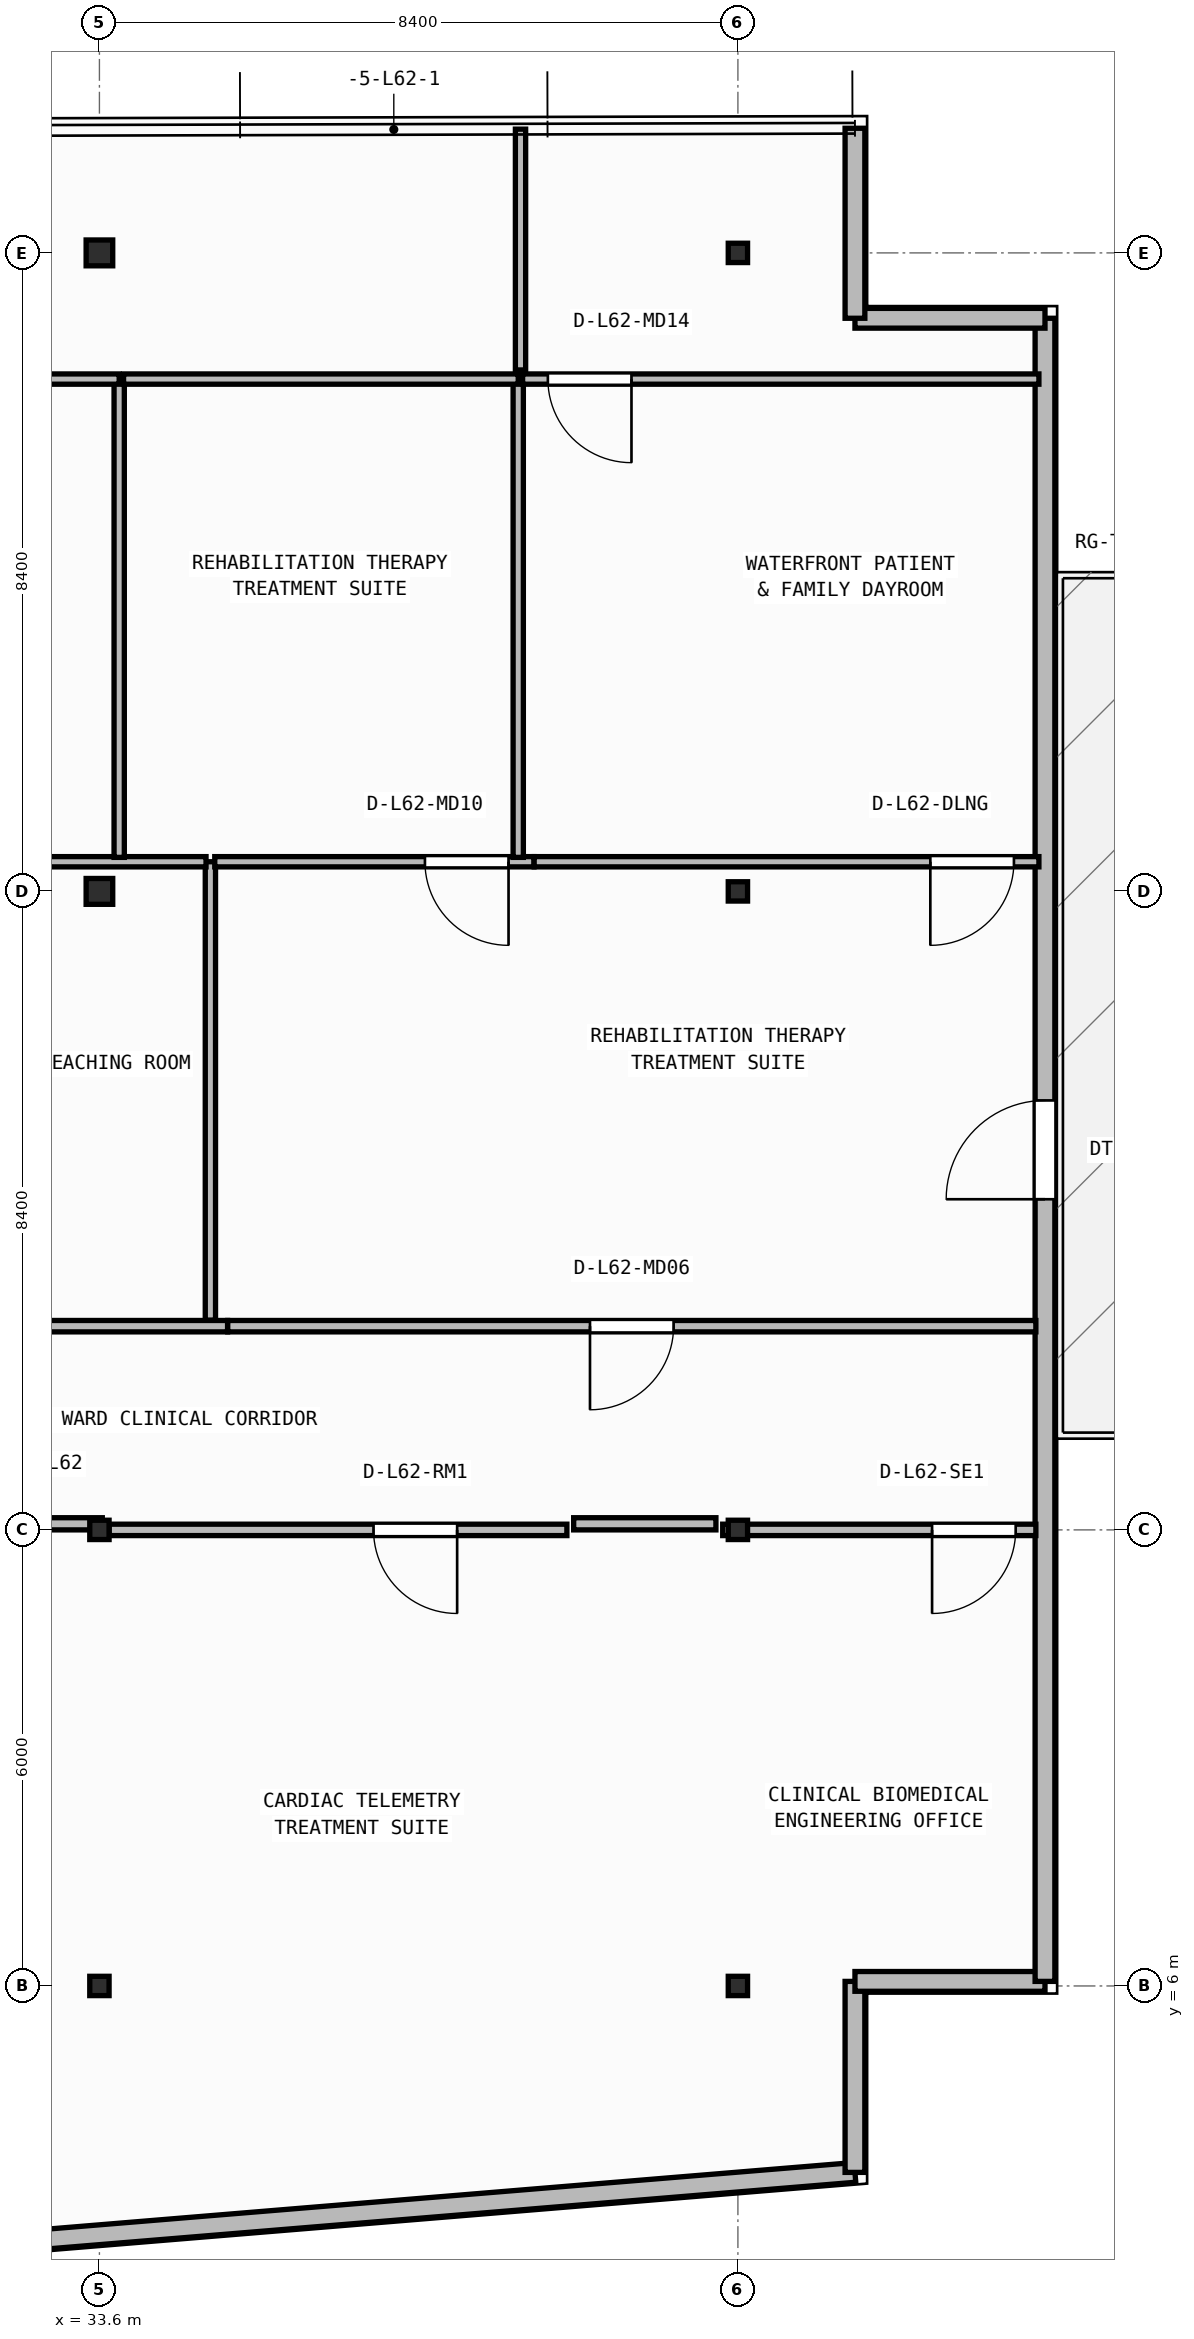
"""IFC4 building model, lengths in metres.
Left out: names, types, materials, properties, quantities, classifications, styles, units other than length and angle.
Written with IfcOpenShell. Run it as: python <this file> out.ifc"""

import sys

from ifc_helpers import new_model, si_unit, direction, frame, frame_2d, origin, origin_2d, place, context, subcontext, project, spatial, rectangle, i_section, extrude, element, fill, save


model = new_model("IFC4")
c1 = context("Model", 3, precision=1e-05, world=origin(), true_north=direction((0.0, 1.0)))
c2 = subcontext(c1, "Body", "Model", "MODEL_VIEW")
j1 = project(units=[si_unit("LENGTHUNIT", "METRE"), si_unit("PLANEANGLEUNIT", "RADIAN")], contexts=[c1])
p1 = place(None, origin())
s1 = spatial("IfcSite", under=j1, at=p1, CompositionType="ELEMENT")
p2 = place(p1, origin())
s2 = spatial("IfcBuilding", under=s1, at=p2, CompositionType="ELEMENT")
p3 = place(p2, frame((0.0, 0.0, 252.6)))
s3 = spatial("IfcBuildingStorey", under=s2, at=p3, CompositionType="ELEMENT", Elevation=252.6)
for number, where, z_axis, x_axis in (
    (1, (33.6, 6.0, 0.0), (0.0, 0.0, 1.0), (1.0, 0.0, 0.0)),
    (2, (42.0, 6.0, 0.0), (0.0, 0.0, 1.0), (1.0, 0.0, 0.0)),
    (3, (33.6, 12.0, 0.0), (0.0, 0.0, 1.0), (1.0, 0.0, 0.0)),
    (4, (42.0, 12.0, 0.0), (0.0, 0.0, 1.0), (1.0, 0.0, 0.0)),
):
    element("IfcColumn", number, at=place(p3, frame(where, z_axis=z_axis, x_axis=x_axis)), inside=s3, PredefinedType="COLUMN", context=c2, shape_type="SweptSolid", body=[
        extrude(i_section(OverallWidth=0.254, OverallDepth=0.254, WebThickness=0.009, FlangeThickness=0.014, FilletRadius=0.013, at=origin_2d()), origin(), (0.0, 0.0, 1.0), 3.95),
    ])
p4 = place(p3, frame((33.6, 20.4, 0.0), z_axis=(0.0, 0.0, 1.0), x_axis=(1.0, 0.0, 0.0)))
e5 = element("IfcColumn", 5, at=p4, inside=s3, PredefinedType="COLUMN", context=c2, shape_type="SweptSolid", body=[
    extrude(i_section(OverallWidth=0.35, OverallDepth=0.34, WebThickness=0.016, FlangeThickness=0.028, at=origin_2d()), origin(), (0.0, 0.0, 1.0), 3.95),
])
p5 = place(p3, frame((42.0, 20.4, 0.0), z_axis=(0.0, 0.0, 1.0), x_axis=(1.0, 0.0, 0.0)))
e6 = element("IfcColumn", 6, at=p5, inside=s3, PredefinedType="COLUMN", context=c2, shape_type="SweptSolid", body=[
    extrude(i_section(OverallWidth=0.254, OverallDepth=0.254, WebThickness=0.009, FlangeThickness=0.014, FilletRadius=0.013, at=origin_2d()), origin(), (0.0, 0.0, 1.0), 3.95),
])
p6 = place(p3, frame((33.6, 28.8, 0.0), z_axis=(0.0, 0.0, 1.0), x_axis=(1.0, 0.0, 0.0)))
e7 = element("IfcColumn", 7, at=p6, inside=s3, PredefinedType="COLUMN", context=c2, shape_type="SweptSolid", body=[
    extrude(i_section(OverallWidth=0.35, OverallDepth=0.34, WebThickness=0.016, FlangeThickness=0.028, at=origin_2d()), origin(), (0.0, 0.0, 1.0), 3.95),
])
p7 = place(p3, frame((42.0, 28.8, 0.0), z_axis=(0.0, 0.0, 1.0), x_axis=(1.0, 0.0, 0.0)))
e8 = element("IfcColumn", 8, at=p7, inside=s3, PredefinedType="COLUMN", context=c2, shape_type="SweptSolid", body=[
    extrude(i_section(OverallWidth=0.254, OverallDepth=0.254, WebThickness=0.009, FlangeThickness=0.014, FilletRadius=0.013, at=origin_2d()), origin(), (0.0, 0.0, 1.0), 3.95),
])
p8 = place(p3, frame((2.66, 0.174, 0.0), z_axis=(0.0, 0.0, 1.0), x_axis=(0.996611813627, 0.082248969229, 0.0)))
e9 = element("IfcWall", 9, at=p8, inside=s3, PredefinedType="STANDARD", context=c2, shape_type="SweptSolid", body=[
    extrude(rectangle(XDim=41.019, YDim=0.26, at=frame_2d((20.51, 0.0))), origin(), (0.0, 0.0, 1.0), 3.71),
])
p9 = place(p8, frame((19.31, 0.0, 0.9)))
e10 = element("IfcOpeningElement", 10, at=p9, cuts=e9, PredefinedType="OPENING", context=c2, shape_type="SweptSolid", body=[
    extrude(rectangle(XDim=2.4, YDim=1.65, at=frame_2d((1.2, 0.825))), frame((0.0, 0.14, 0.0), z_axis=(0.0, -1.0, 0.0), x_axis=(1.0, 0.0, 0.0)), (0.0, 0.0, 1.0), 0.28),
])
p10 = place(p3, frame((43.54, 3.547, 0.0), z_axis=(0.0, 0.0, 1.0), x_axis=(0.0, 1.0, 0.0)))
e11 = element("IfcWall", 11, at=p10, inside=s3, PredefinedType="STANDARD", context=c2, shape_type="SweptSolid", body=[
    extrude(rectangle(XDim=2.513, YDim=0.26, at=frame_2d((1.256, 0.0))), origin(), (0.0, 0.0, 1.0), 3.71),
])
p11 = place(p3, frame((43.54, 6.06, 0.0), z_axis=(0.0, 0.0, 1.0), x_axis=(1.0, 0.0, 0.0)))
e12 = element("IfcWall", 12, at=p11, inside=s3, PredefinedType="STANDARD", context=c2, shape_type="SweptSolid", body=[
    extrude(rectangle(XDim=2.5, YDim=0.26, at=frame_2d((1.25, 0.0))), origin(), (0.0, 0.0, 1.0), 3.71),
])
p12 = place(p3, frame((46.04, 6.06, 0.0), z_axis=(0.0, 0.0, 1.0), x_axis=(0.0, 1.0, 0.0)))
e13 = element("IfcWall", 13, at=p12, inside=s3, PredefinedType="STANDARD", context=c2, shape_type="SweptSolid", body=[
    extrude(rectangle(XDim=21.88, YDim=0.26, at=frame_2d((10.94, 0.0))), origin(), (0.0, 0.0, 1.0), 3.71),
])
p13 = place(p12, frame((10.29, 0.0, 0.0)))
e14 = element("IfcOpeningElement", 14, at=p13, cuts=e13, PredefinedType="OPENING", context=c2, shape_type="SweptSolid", body=[
    extrude(rectangle(XDim=1.3, YDim=2.15, at=frame_2d((0.65, 1.075))), frame((0.0, 0.14, 0.0), z_axis=(0.0, -1.0, 0.0), x_axis=(1.0, 0.0, 0.0)), (0.0, 0.0, 1.0), 0.28),
])
p14 = place(p3, frame((46.04, 27.94, 0.0), z_axis=(0.0, 0.0, 1.0), x_axis=(-1.0, 0.0, 0.0)))
e15 = element("IfcWall", 15, at=p14, inside=s3, PredefinedType="STANDARD", context=c2, shape_type="SweptSolid", body=[
    extrude(rectangle(XDim=2.5, YDim=0.26, at=frame_2d((1.25, 0.0))), origin(), (0.0, 0.0, 1.0), 3.71),
])
p15 = place(p3, frame((43.54, 27.94, 0.0), z_axis=(0.0, 0.0, 1.0), x_axis=(0.0, 1.0, 0.0)))
e16 = element("IfcWall", 16, at=p15, inside=s3, PredefinedType="STANDARD", context=c2, shape_type="SweptSolid", body=[
    extrude(rectangle(XDim=2.5, YDim=0.26, at=frame_2d((1.25, 0.0))), origin(), (0.0, 0.0, 1.0), 3.71),
])
p16 = place(p3, frame((39.75, 12.0, 0.0), z_axis=(0.0, 0.0, 1.0), x_axis=(-1.0, 0.0, 0.0)))
e17 = element("IfcWall", 17, at=p16, inside=s3, PredefinedType="PARTITIONING", context=c2, shape_type="SweptSolid", body=[
    extrude(rectangle(XDim=6.023, YDim=0.15, at=frame_2d((3.011, 0.0))), origin(), (0.0, 0.0, 1.0), 3.157),
])
p17 = place(p16, frame((1.444, 0.0, 0.0)))
e18 = element("IfcOpeningElement", 18, at=p17, cuts=e17, PredefinedType="OPENING", context=c2, shape_type="SweptSolid", body=[
    extrude(rectangle(XDim=1.1, YDim=2.1, at=frame_2d((0.55, 1.05))), frame((0.0, 0.085, 0.0), z_axis=(0.0, -1.0, 0.0), x_axis=(1.0, 0.0, 0.0)), (0.0, 0.0, 1.0), 0.17),
])
p18 = place(p3, frame((45.92, 12.0, 0.0), z_axis=(0.0, 0.0, 1.0), x_axis=(-1.0, 0.0, 0.0)))
e19 = element("IfcWall", 19, at=p18, inside=s3, PredefinedType="PARTITIONING", context=c2, shape_type="SweptSolid", body=[
    extrude(rectangle(XDim=4.12, YDim=0.15, at=frame_2d((2.06, 0.0))), origin(), (0.0, 0.0, 1.0), 3.157),
])
p19 = place(p18, frame((0.265, 0.0, 0.0)))
e20 = element("IfcOpeningElement", 20, at=p19, cuts=e19, PredefinedType="OPENING", context=c2, shape_type="SweptSolid", body=[
    extrude(rectangle(XDim=1.1, YDim=2.1, at=frame_2d((0.55, 1.05))), frame((0.0, 0.085, 0.0), z_axis=(0.0, -1.0, 0.0), x_axis=(1.0, 0.0, 0.0)), (0.0, 0.0, 1.0), 0.17),
])
p20 = place(p3, frame((35.286, 14.68, 0.0), z_axis=(0.0, 0.0, 1.0), x_axis=(-1.0, 0.0, 0.0)))
e21 = element("IfcWall", 21, at=p20, inside=s3, PredefinedType="PARTITIONING", context=c2, shape_type="SweptSolid", body=[
    extrude(rectangle(XDim=9.298, YDim=0.15, at=frame_2d((4.649, 0.0))), origin(), (0.0, 0.0, 1.0), 3.71),
])
p21 = place(p20, frame((4.099, 0.0, 0.0)))
e22 = element("IfcOpeningElement", 22, at=p21, cuts=e21, PredefinedType="OPENING", context=c2, shape_type="SweptSolid", body=[
    extrude(rectangle(XDim=1.1, YDim=2.1, at=frame_2d((0.55, 1.05))), frame((0.0, 0.085, 0.0), z_axis=(0.0, -1.0, 0.0), x_axis=(1.0, 0.0, 0.0)), (0.0, 0.0, 1.0), 0.17),
])
p22 = place(p3, frame((45.92, 14.68, 0.0), z_axis=(0.0, 0.0, 1.0), x_axis=(-1.0, 0.0, 0.0)))
e23 = element("IfcWall", 23, at=p22, inside=s3, PredefinedType="PARTITIONING", context=c2, shape_type="SweptSolid", body=[
    extrude(rectangle(XDim=10.632, YDim=0.15, at=frame_2d((5.316, 0.0))), origin(), (0.0, 0.0, 1.0), 3.71),
])
p23 = place(p22, frame((4.766, 0.0, 0.0)))
e24 = element("IfcOpeningElement", 24, at=p23, cuts=e23, PredefinedType="OPENING", context=c2, shape_type="SweptSolid", body=[
    extrude(rectangle(XDim=1.1, YDim=2.1, at=frame_2d((0.55, 1.05))), frame((0.0, 0.085, 0.0), z_axis=(0.0, -1.0, 0.0), x_axis=(1.0, 0.0, 0.0)), (0.0, 0.0, 1.0), 0.17),
])
p24 = place(p3, frame((35.06, 14.76, 0.0), z_axis=(0.0, 0.0, 1.0), x_axis=(0.0, 1.0, 0.0)))
e25 = element("IfcWall", 25, at=p24, inside=s3, PredefinedType="PARTITIONING", context=c2, shape_type="SweptSolid", body=[
    extrude(rectangle(XDim=6.03, YDim=0.135, at=frame_2d((3.015, 0.0))), origin(), (0.0, 0.0, 1.0), 3.71),
])
p25 = place(p3, frame((35.002, 20.79, 0.0), z_axis=(0.0, 0.0, 1.0), x_axis=(-1.0, 0.0, 0.0)))
e26 = element("IfcWall", 26, at=p25, inside=s3, PredefinedType="PARTITIONING", context=c2, shape_type="SweptSolid", body=[
    extrude(rectangle(XDim=9.185, YDim=0.135, at=frame_2d((4.593, 0.0))), origin(), (0.0, 0.0, 1.0), 3.157),
])
p26 = place(p25, frame((5.003, 0.0, 0.0)))
e27 = element("IfcOpeningElement", 27, at=p26, cuts=e26, PredefinedType="OPENING", context=c2, shape_type="SweptSolid", body=[
    extrude(rectangle(XDim=1.1, YDim=2.1, at=frame_2d((0.55, 1.05))), frame((0.0, 0.077, 0.0), z_axis=(0.0, -1.0, 0.0), x_axis=(1.0, 0.0, 0.0)), (0.0, 0.0, 1.0), 0.155),
])
p27 = place(p3, frame((39.317, 20.79, 0.0), z_axis=(0.0, 0.0, 1.0), x_axis=(-1.0, 0.0, 0.0)))
e28 = element("IfcWall", 28, at=p27, inside=s3, PredefinedType="PARTITIONING", context=c2, shape_type="SweptSolid", body=[
    extrude(rectangle(XDim=4.2, YDim=0.135, at=frame_2d((2.1, 0.0))), origin(), (0.0, 0.0, 1.0), 3.157),
])
p28 = place(p27, frame((0.335, 0.0, 0.0)))
e29 = element("IfcOpeningElement", 29, at=p28, cuts=e28, PredefinedType="OPENING", context=c2, shape_type="SweptSolid", body=[
    extrude(rectangle(XDim=1.1, YDim=2.1, at=frame_2d((0.55, 1.05))), frame((0.0, 0.077, 0.0), z_axis=(0.0, -1.0, 0.0), x_axis=(1.0, 0.0, 0.0)), (0.0, 0.0, 1.0), 0.155),
])
p29 = place(p3, frame((45.96, 20.79, 0.0), z_axis=(0.0, 0.0, 1.0), x_axis=(-1.0, 0.0, 0.0)))
e30 = element("IfcWall", 30, at=p29, inside=s3, PredefinedType="PARTITIONING", context=c2, shape_type="SweptSolid", body=[
    extrude(rectangle(XDim=6.64, YDim=0.135, at=frame_2d((3.32, 0.0))), origin(), (0.0, 0.0, 1.0), 3.157),
])
p30 = place(p29, frame((0.329, 0.0, 0.0)))
e31 = element("IfcOpeningElement", 31, at=p30, cuts=e30, PredefinedType="OPENING", context=c2, shape_type="SweptSolid", body=[
    extrude(rectangle(XDim=1.1, YDim=2.1, at=frame_2d((0.55, 1.05))), frame((0.0, 0.077, 0.0), z_axis=(0.0, -1.0, 0.0), x_axis=(1.0, 0.0, 0.0)), (0.0, 0.0, 1.0), 0.155),
])
p31 = place(p3, frame((33.86, 20.847, 0.0), z_axis=(0.0, 0.0, 1.0), x_axis=(0.0, 1.0, 0.0)))
e32 = element("IfcWall", 32, at=p31, inside=s3, PredefinedType="PARTITIONING", context=c2, shape_type="SweptSolid", body=[
    extrude(rectangle(XDim=6.292, YDim=0.135, at=frame_2d((3.146, 0.0))), origin(), (0.0, 0.0, 1.0), 3.157),
])
p32 = place(p3, frame((33.86, 27.14, 0.0), z_axis=(0.0, 0.0, 1.0), x_axis=(-1.0, 0.0, 0.0)))
e33 = element("IfcWall", 33, at=p32, inside=s3, PredefinedType="PARTITIONING", context=c2, shape_type="SweptSolid", body=[
    extrude(rectangle(XDim=10.783, YDim=0.135, at=frame_2d((5.391, 0.0))), origin(), (0.0, 0.0, 1.0), 3.71),
])
p33 = place(p32, frame((3.913, 0.0, 0.0)))
e34 = element("IfcOpeningElement", 34, at=p33, cuts=e33, PredefinedType="OPENING", context=c2, shape_type="SweptSolid", body=[
    extrude(rectangle(XDim=1.1, YDim=2.1, at=frame_2d((0.55, 1.05))), frame((0.0, 0.077, 0.0), z_axis=(0.0, -1.0, 0.0), x_axis=(1.0, 0.0, 0.0)), (0.0, 0.0, 1.0), 0.155),
])
p34 = place(p3, frame((39.11, 20.847, 0.0), z_axis=(0.0, 0.0, 1.0), x_axis=(0.0, 1.0, 0.0)))
e35 = element("IfcWall", 35, at=p34, inside=s3, PredefinedType="PARTITIONING", context=c2, shape_type="SweptSolid", body=[
    extrude(rectangle(XDim=6.292, YDim=0.135, at=frame_2d((3.146, 0.0))), origin(), (0.0, 0.0, 1.0), 3.71),
])
p35 = place(p3, frame((39.11, 27.14, 0.0), z_axis=(0.0, 0.0, 1.0), x_axis=(-1.0, 0.0, 0.0)))
e36 = element("IfcWall", 36, at=p35, inside=s3, PredefinedType="PARTITIONING", context=c2, shape_type="SweptSolid", body=[
    extrude(rectangle(XDim=5.193, YDim=0.135, at=frame_2d((2.596, 0.0))), origin(), (0.0, 0.0, 1.0), 3.71),
])
p36 = place(p3, frame((45.96, 27.14, 0.0), z_axis=(0.0, 0.0, 1.0), x_axis=(-1.0, 0.0, 0.0)))
e37 = element("IfcWall", 37, at=p36, inside=s3, PredefinedType="PARTITIONING", context=c2, shape_type="SweptSolid", body=[
    extrude(rectangle(XDim=6.792, YDim=0.135, at=frame_2d((3.396, 0.0))), origin(), (0.0, 0.0, 1.0), 3.71),
])
p37 = place(p36, frame((5.36, 0.0, 0.0)))
e38 = element("IfcOpeningElement", 38, at=p37, cuts=e37, PredefinedType="OPENING", context=c2, shape_type="SweptSolid", body=[
    extrude(rectangle(XDim=1.1, YDim=2.1, at=frame_2d((0.55, 1.05))), frame((0.0, 0.077, 0.0), z_axis=(0.0, -1.0, 0.0), x_axis=(1.0, 0.0, 0.0)), (0.0, 0.0, 1.0), 0.155),
])
p38 = place(p3, frame((39.14, 27.26, 0.0), z_axis=(0.0, 0.0, 1.0), x_axis=(0.0, 1.0, 0.0)))
e39 = element("IfcWall", 39, at=p38, inside=s3, PredefinedType="PARTITIONING", context=c2, shape_type="SweptSolid", body=[
    extrude(rectangle(XDim=3.168, YDim=0.135, at=frame_2d((1.584, 0.0))), origin(), (0.0, 0.0, 1.0), 3.71),
])
p39 = place(p3, frame((31.439, 12.08, 0.0), z_axis=(0.0, 0.0, 1.0), x_axis=(1.0, 0.0, 0.0)))
e40 = element("IfcWall", 40, at=p39, inside=s3, PredefinedType="PARTITIONING", context=c2, shape_type="SweptSolid", body=[
    extrude(rectangle(XDim=2.198, YDim=0.16, at=frame_2d((1.099, 0.0))), origin(), (0.0, 0.0, 1.0), 3.157),
])
p40 = place(p3, frame((39.839, 12.08, 0.0), z_axis=(0.0, 0.0, 1.0), x_axis=(1.0, 0.0, 0.0)))
e41 = element("IfcWall", 41, at=p40, inside=s3, PredefinedType="PARTITIONING", context=c2, shape_type="SweptSolid", body=[
    extrude(rectangle(XDim=1.871, YDim=0.16, at=frame_2d((0.936, 0.0))), origin(), (0.0, 0.0, 1.0), 3.157),
])
p41 = place(p13, origin())
e42 = element("IfcDoor", 42, at=p41, inside=s3, OperationType="SINGLE_SWING_LEFT", PredefinedType="DOOR", context=c2, shape_type="SweptSolid", body=[
    extrude(rectangle(XDim=1.3, YDim=2.15, at=frame_2d((0.65, 1.075))), frame((0.0, 0.025, 0.0), z_axis=(0.0, -1.0, 0.0), x_axis=(1.0, 0.0, 0.0)), (0.0, 0.0, 1.0), 0.05),
])
fill(e14, e42)
p42 = place(p17, origin())
e43 = element("IfcDoor", 43, at=p42, inside=s3, OperationType="SINGLE_SWING_LEFT", PredefinedType="DOOR", context=c2, shape_type="SweptSolid", body=[
    extrude(rectangle(XDim=1.1, YDim=2.1, at=frame_2d((0.55, 1.05))), frame((0.0, 0.025, 0.0), z_axis=(0.0, -1.0, 0.0), x_axis=(1.0, 0.0, 0.0)), (0.0, 0.0, 1.0), 0.05),
])
fill(e18, e43)
p43 = place(p19, origin())
e44 = element("IfcDoor", 44, at=p43, inside=s3, OperationType="SINGLE_SWING_RIGHT", PredefinedType="DOOR", context=c2, shape_type="SweptSolid", body=[
    extrude(rectangle(XDim=1.1, YDim=2.1, at=frame_2d((0.55, 1.05))), frame((0.0, 0.025, 0.0), z_axis=(0.0, -1.0, 0.0), x_axis=(1.0, 0.0, 0.0)), (0.0, 0.0, 1.0), 0.05),
])
fill(e20, e44)
p44 = place(p23, origin())
e45 = element("IfcDoor", 45, at=p44, inside=s3, OperationType="SINGLE_SWING_RIGHT", PredefinedType="DOOR", context=c2, shape_type="SweptSolid", body=[
    extrude(rectangle(XDim=1.1, YDim=2.1, at=frame_2d((0.55, 1.05))), frame((0.0, 0.025, 0.0), z_axis=(0.0, -1.0, 0.0), x_axis=(1.0, 0.0, 0.0)), (0.0, 0.0, 1.0), 0.05),
])
fill(e24, e45)
p45 = place(p28, origin())
e46 = element("IfcDoor", 46, at=p45, inside=s3, OperationType="SINGLE_SWING_LEFT", PredefinedType="DOOR", context=c2, shape_type="SweptSolid", body=[
    extrude(rectangle(XDim=1.1, YDim=2.1, at=frame_2d((0.55, 1.05))), frame((0.0, 0.025, 0.0), z_axis=(0.0, -1.0, 0.0), x_axis=(1.0, 0.0, 0.0)), (0.0, 0.0, 1.0), 0.05),
])
fill(e29, e46)
p46 = place(p30, origin())
e47 = element("IfcDoor", 47, at=p46, inside=s3, OperationType="SINGLE_SWING_RIGHT", PredefinedType="DOOR", context=c2, shape_type="SweptSolid", body=[
    extrude(rectangle(XDim=1.1, YDim=2.1, at=frame_2d((0.55, 1.05))), frame((0.0, 0.025, 0.0), z_axis=(0.0, -1.0, 0.0), x_axis=(1.0, 0.0, 0.0)), (0.0, 0.0, 1.0), 0.05),
])
fill(e31, e47)
p47 = place(p37, origin())
e48 = element("IfcDoor", 48, at=p47, inside=s3, OperationType="SINGLE_SWING_LEFT", PredefinedType="DOOR", context=c2, shape_type="SweptSolid", body=[
    extrude(rectangle(XDim=1.1, YDim=2.1, at=frame_2d((0.55, 1.05))), frame((0.0, 0.025, 0.0), z_axis=(0.0, -1.0, 0.0), x_axis=(1.0, 0.0, 0.0)), (0.0, 0.0, 1.0), 0.05),
])
fill(e38, e48)
save(model, sys.argv[1])
